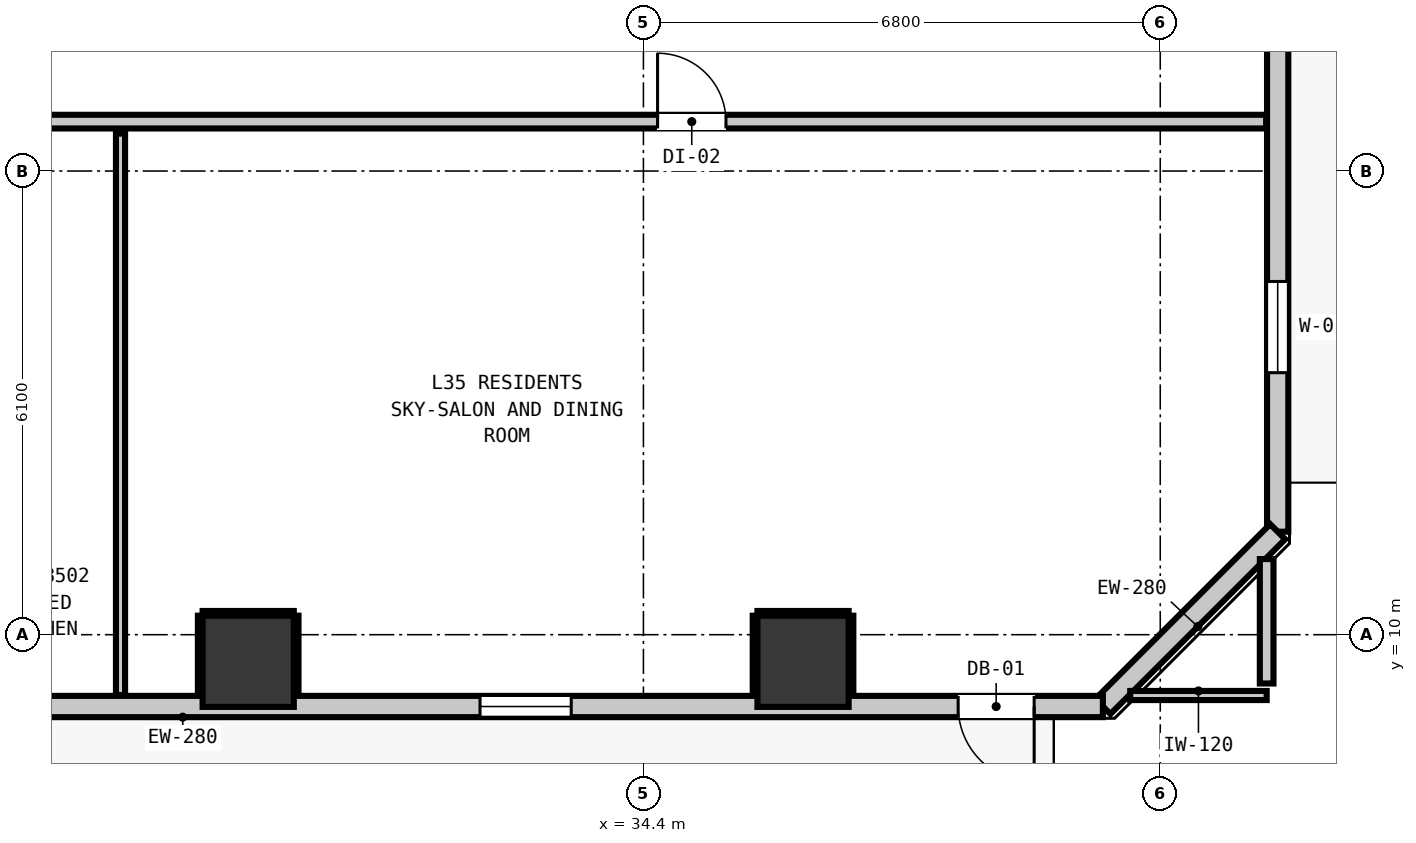
"""IFC4 building model, lengths in metres.
Left out: names, types, materials, properties, quantities, classifications, styles, units other than length and angle.
Written with IfcOpenShell. Run it as: python <this file> out.ifc"""

import sys

from ifc_helpers import new_model, si_unit, direction, frame, frame_2d, origin, origin_2d, place, context, subcontext, project, spatial, rectangle, extrude, element, fill, save


model = new_model("IFC4")
c1 = context("Model", 3, precision=1e-05, world=origin(), true_north=direction((0.0, 1.0)))
c2 = subcontext(c1, "Body", "Model", "MODEL_VIEW")
j1 = project(units=[si_unit("LENGTHUNIT", "METRE"), si_unit("PLANEANGLEUNIT", "RADIAN")], contexts=[c1])
p1 = place(None, origin())
s1 = spatial("IfcSite", under=j1, at=p1, CompositionType="ELEMENT")
p2 = place(p1, origin())
s2 = spatial("IfcBuilding", under=s1, at=p2, CompositionType="ELEMENT")
p3 = place(p2, frame((0.0, 0.0, 122.68)))
s3 = spatial("IfcBuildingStorey", under=s2, at=p3, CompositionType="ELEMENT", Elevation=122.68)
for number, where, z_axis, x_axis in (
    (1, (29.2, 9.65, 0.0), (0.0, 0.0, 1.0), (1.0, 0.0, 0.0)),
    (2, (36.5, 9.65, 0.0), (0.0, 0.0, 1.0), (1.0, 0.0, 0.0)),
):
    element("IfcColumn", number, at=place(p3, frame(where, z_axis=z_axis, x_axis=x_axis)), inside=s3, PredefinedType="COLUMN", context=c2, shape_type="SweptSolid", body=[
        extrude(rectangle(XDim=1.2, YDim=1.2, at=origin_2d()), origin(), (0.0, 0.0, 1.0), 2.9),
    ])
p4 = place(p3, frame((42.745, 43.645, 0.0), z_axis=(0.0, 0.0, 1.0), x_axis=(0.0, -1.0, 0.0)))
e3 = element("IfcWall", 3, at=p4, inside=s3, PredefinedType="STANDARD", context=c2, shape_type="SweptSolid", body=[
    extrude(rectangle(XDim=32.29, YDim=0.28, at=frame_2d((16.145, 0.0))), origin(), (0.0, 0.0, 1.0), 2.9),
])
p5 = place(p4, frame((5.467, 0.0, 0.0)))
e4 = element("IfcOpeningElement", 4, at=p5, cuts=e3, PredefinedType="OPENING", context=c2, shape_type="SweptSolid", body=[
    extrude(rectangle(XDim=1.0, YDim=2.15, at=frame_2d((0.5, 1.075))), frame((0.0, 0.15, 0.0), z_axis=(0.0, -1.0, 0.0), x_axis=(1.0, 0.0, 0.0)), (0.0, 0.0, 1.0), 0.3),
])
p6 = place(p4, frame((28.998, 0.0, 0.85)))
e5 = element("IfcOpeningElement", 5, at=p6, cuts=e3, PredefinedType="OPENING", context=c2, shape_type="SweptSolid", body=[
    extrude(rectangle(XDim=1.2, YDim=1.8, at=frame_2d((0.6, 0.9))), frame((0.0, 0.15, 0.0), z_axis=(0.0, -1.0, 0.0), x_axis=(1.0, 0.0, 0.0)), (0.0, 0.0, 1.0), 0.3),
])
p7 = place(p4, frame((0.318, 0.0, 0.85)))
e6 = element("IfcOpeningElement", 6, at=p7, cuts=e3, PredefinedType="OPENING", context=c2, shape_type="SweptSolid", body=[
    extrude(rectangle(XDim=1.05, YDim=1.65, at=frame_2d((0.525, 0.825))), frame((0.0, 0.15, 0.0), z_axis=(0.0, -1.0, 0.0), x_axis=(1.0, 0.0, 0.0)), (0.0, 0.0, 1.0), 0.3),
])
p8 = place(p4, frame((15.783, 0.0, 0.85)))
e7 = element("IfcOpeningElement", 7, at=p8, cuts=e3, PredefinedType="OPENING", context=c2, shape_type="SweptSolid", body=[
    extrude(rectangle(XDim=1.2, YDim=1.8, at=frame_2d((0.6, 0.9))), frame((0.0, 0.15, 0.0), z_axis=(0.0, -1.0, 0.0), x_axis=(1.0, 0.0, 0.0)), (0.0, 0.0, 1.0), 0.3),
])
p9 = place(p3, frame((42.745, 11.355, 0.0), z_axis=(0.0, 0.0, 1.0), x_axis=(-0.707106781187, -0.707106781187, 0.0)))
e8 = element("IfcWall", 8, at=p9, inside=s3, PredefinedType="STANDARD", context=c2, shape_type="SweptSolid", body=[
    extrude(rectangle(XDim=3.253, YDim=0.28, at=frame_2d((1.626, 0.0))), origin(), (0.0, 0.0, 1.0), 2.9),
])
p10 = place(p3, frame((40.445, 9.055, 0.0), z_axis=(0.0, 0.0, 1.0), x_axis=(-1.0, 0.0, 0.0)))
e9 = element("IfcWall", 9, at=p10, inside=s3, PredefinedType="STANDARD", context=c2, shape_type="SweptSolid", body=[
    extrude(rectangle(XDim=35.09, YDim=0.28, at=frame_2d((17.545, 0.0))), origin(), (0.0, 0.0, 1.0), 2.9),
])
p11 = place(p10, frame((0.904, 0.0, 0.0)))
e10 = element("IfcOpeningElement", 10, at=p11, cuts=e9, PredefinedType="OPENING", context=c2, shape_type="SweptSolid", body=[
    extrude(rectangle(XDim=1.0, YDim=2.15, at=frame_2d((0.5, 1.075))), frame((0.0, 0.15, 0.0), z_axis=(0.0, -1.0, 0.0), x_axis=(1.0, 0.0, 0.0)), (0.0, 0.0, 1.0), 0.3),
])
p12 = place(p10, frame((30.341, 0.0, 0.85)))
e11 = element("IfcOpeningElement", 11, at=p12, cuts=e9, PredefinedType="OPENING", context=c2, shape_type="SweptSolid", body=[
    extrude(rectangle(XDim=1.2, YDim=1.8, at=frame_2d((0.6, 0.9))), frame((0.0, 0.15, 0.0), z_axis=(0.0, -1.0, 0.0), x_axis=(1.0, 0.0, 0.0)), (0.0, 0.0, 1.0), 0.3),
])
p13 = place(p10, frame((33.579, 0.0, 0.85)))
e12 = element("IfcOpeningElement", 12, at=p13, cuts=e9, PredefinedType="OPENING", context=c2, shape_type="SweptSolid", body=[
    extrude(rectangle(XDim=1.2, YDim=1.8, at=frame_2d((0.6, 0.9))), frame((0.0, 0.15, 0.0), z_axis=(0.0, -1.0, 0.0), x_axis=(1.0, 0.0, 0.0)), (0.0, 0.0, 1.0), 0.3),
])
p14 = place(p10, frame((16.017, 0.0, 0.85)))
e13 = element("IfcOpeningElement", 13, at=p14, cuts=e9, PredefinedType="OPENING", context=c2, shape_type="SweptSolid", body=[
    extrude(rectangle(XDim=1.2, YDim=1.8, at=frame_2d((0.6, 0.9))), frame((0.0, 0.15, 0.0), z_axis=(0.0, -1.0, 0.0), x_axis=(1.0, 0.0, 0.0)), (0.0, 0.0, 1.0), 0.3),
])
p15 = place(p10, frame((21.665, 0.0, 0.85)))
e14 = element("IfcOpeningElement", 14, at=p15, cuts=e9, PredefinedType="OPENING", context=c2, shape_type="SweptSolid", body=[
    extrude(rectangle(XDim=1.2, YDim=1.8, at=frame_2d((0.6, 0.9))), frame((0.0, 0.15, 0.0), z_axis=(0.0, -1.0, 0.0), x_axis=(1.0, 0.0, 0.0)), (0.0, 0.0, 1.0), 0.3),
])
p16 = place(p10, frame((6.995, 0.0, 0.85)))
e15 = element("IfcOpeningElement", 15, at=p16, cuts=e9, PredefinedType="OPENING", context=c2, shape_type="SweptSolid", body=[
    extrude(rectangle(XDim=1.2, YDim=1.8, at=frame_2d((0.6, 0.9))), frame((0.0, 0.15, 0.0), z_axis=(0.0, -1.0, 0.0), x_axis=(1.0, 0.0, 0.0)), (0.0, 0.0, 1.0), 0.3),
])
p17 = place(p3, frame((3.207, 16.75, 0.0), z_axis=(0.0, 0.0, 1.0), x_axis=(1.0, 0.0, 0.0)))
e16 = element("IfcWall", 16, at=p17, inside=s3, PredefinedType="PARTITIONING", context=c2, shape_type="SweptSolid", body=[
    extrude(rectangle(XDim=39.386, YDim=0.18, at=frame_2d((19.693, 0.0))), origin(), (0.0, 0.0, 1.0), 2.9),
])
p18 = place(p17, frame((5.797, 0.0, 0.0)))
e17 = element("IfcOpeningElement", 17, at=p18, cuts=e16, PredefinedType="OPENING", context=c2, shape_type="SweptSolid", body=[
    extrude(rectangle(XDim=1.0, YDim=2.15, at=frame_2d((0.5, 1.075))), frame((0.0, 0.1, 0.0), z_axis=(0.0, -1.0, 0.0), x_axis=(1.0, 0.0, 0.0)), (0.0, 0.0, 1.0), 0.2),
])
p19 = place(p17, frame((20.121, 0.0, 0.0)))
e18 = element("IfcOpeningElement", 18, at=p19, cuts=e16, PredefinedType="OPENING", context=c2, shape_type="SweptSolid", body=[
    extrude(rectangle(XDim=1.0, YDim=2.15, at=frame_2d((0.5, 1.075))), frame((0.0, 0.1, 0.0), z_axis=(0.0, -1.0, 0.0), x_axis=(1.0, 0.0, 0.0)), (0.0, 0.0, 1.0), 0.2),
])
p20 = place(p17, frame((31.379, 0.0, 0.0)))
e19 = element("IfcOpeningElement", 19, at=p20, cuts=e16, PredefinedType="OPENING", context=c2, shape_type="SweptSolid", body=[
    extrude(rectangle(XDim=0.9, YDim=2.1, at=frame_2d((0.45, 1.05))), frame((0.0, 0.1, 0.0), z_axis=(0.0, -1.0, 0.0), x_axis=(1.0, 0.0, 0.0)), (0.0, 0.0, 1.0), 0.2),
])
p21 = place(p3, frame((40.805, 9.2, 0.0), z_axis=(0.0, 0.0, 1.0), x_axis=(1.0, 0.0, 0.0)))
e20 = element("IfcWall", 20, at=p21, inside=s3, PredefinedType="PARTITIONING", context=c2, shape_type="SweptSolid", body=[
    extrude(rectangle(XDim=1.795, YDim=0.12, at=frame_2d((0.897, 0.0))), origin(), (0.0, 0.0, 1.0), 2.9),
])
p22 = place(p3, frame((42.6, 9.358, 0.0), z_axis=(0.0, 0.0, 1.0), x_axis=(0.0, 1.0, 0.0)))
e21 = element("IfcWall", 21, at=p22, inside=s3, PredefinedType="PARTITIONING", context=c2, shape_type="SweptSolid", body=[
    extrude(rectangle(XDim=1.637, YDim=0.18, at=frame_2d((0.819, 0.0))), origin(), (0.0, 0.0, 1.0), 2.9),
])
p23 = place(p3, frame((27.52, 9.207, 0.0), z_axis=(0.0, 0.0, 1.0), x_axis=(0.0, 1.0, 0.0)))
e22 = element("IfcWall", 22, at=p23, inside=s3, PredefinedType="PARTITIONING", context=c2, shape_type="SweptSolid", body=[
    extrude(rectangle(XDim=7.385, YDim=0.12, at=frame_2d((3.692, 0.0))), origin(), (0.0, 0.0, 1.0), 2.9),
])
p24 = place(p3, frame((28.6, 10.282, 0.0), z_axis=(0.0, 0.0, 1.0), x_axis=(1.0, 0.0, 0.0)))
e23 = element("IfcWall", 23, at=p24, inside=s3, PredefinedType="PARTITIONING", context=c2, shape_type="SweptSolid", body=[
    extrude(rectangle(XDim=1.2, YDim=0.06, at=frame_2d((0.6, 0.0))), origin(), (0.0, 0.0, 1.0), 1.45),
])
for number, where, z_axis, x_axis in (
    (24, (28.568, 9.21, 0.0), (0.0, 0.0, 1.0), (0.0, 1.0, 0.0)),
    (25, (29.832, 9.21, 0.0), (0.0, 0.0, 1.0), (0.0, 1.0, 0.0)),
):
    element("IfcWall", number, at=place(p3, frame(where, z_axis=z_axis, x_axis=x_axis)), inside=s3, PredefinedType="PARTITIONING", context=c2, shape_type="SweptSolid", body=[
        extrude(rectangle(XDim=1.04, YDim=0.06, at=frame_2d((0.52, 0.0))), origin(), (0.0, 0.0, 1.0), 0.905),
    ])
p25 = place(p3, frame((35.9, 10.282, 0.0), z_axis=(0.0, 0.0, 1.0), x_axis=(1.0, 0.0, 0.0)))
e26 = element("IfcWall", 26, at=p25, inside=s3, PredefinedType="PARTITIONING", context=c2, shape_type="SweptSolid", body=[
    extrude(rectangle(XDim=1.2, YDim=0.06, at=frame_2d((0.6, 0.0))), origin(), (0.0, 0.0, 1.0), 1.45),
])
for number, where, z_axis, x_axis in (
    (27, (35.868, 9.21, 0.0), (0.0, 0.0, 1.0), (0.0, 1.0, 0.0)),
    (28, (37.132, 9.21, 0.0), (0.0, 0.0, 1.0), (0.0, 1.0, 0.0)),
):
    element("IfcWall", number, at=place(p3, frame(where, z_axis=z_axis, x_axis=x_axis)), inside=s3, PredefinedType="PARTITIONING", context=c2, shape_type="SweptSolid", body=[
        extrude(rectangle(XDim=1.04, YDim=0.06, at=frame_2d((0.52, 0.0))), origin(), (0.0, 0.0, 1.0), 0.905),
    ])
p26 = place(p11, origin())
e29 = element("IfcDoor", 29, at=p26, inside=s3, OperationType="SINGLE_SWING_LEFT", PredefinedType="DOOR", context=c2, shape_type="SweptSolid", body=[
    extrude(rectangle(XDim=1.0, YDim=2.15, at=frame_2d((0.5, 1.075))), frame((0.0, 0.025, 0.0), z_axis=(0.0, -1.0, 0.0), x_axis=(1.0, 0.0, 0.0)), (0.0, 0.0, 1.0), 0.05),
])
fill(e10, e29)
p27 = place(p6, origin())
e30 = element("IfcWindow", 30, at=p27, inside=s3, PartitioningType="SINGLE_PANEL", PredefinedType="WINDOW", context=c2, shape_type="SweptSolid", body=[
    extrude(rectangle(XDim=1.2, YDim=1.8, at=frame_2d((0.6, 0.9))), frame((0.0, 0.03, 0.0), z_axis=(0.0, -1.0, 0.0), x_axis=(1.0, 0.0, 0.0)), (0.0, 0.0, 1.0), 0.06),
])
fill(e5, e30)
p28 = place(p16, origin())
e31 = element("IfcWindow", 31, at=p28, inside=s3, PartitioningType="SINGLE_PANEL", PredefinedType="WINDOW", context=c2, shape_type="SweptSolid", body=[
    extrude(rectangle(XDim=1.2, YDim=1.8, at=frame_2d((0.6, 0.9))), frame((0.0, 0.03, 0.0), z_axis=(0.0, -1.0, 0.0), x_axis=(1.0, 0.0, 0.0)), (0.0, 0.0, 1.0), 0.06),
])
fill(e15, e31)
p29 = place(p20, origin())
e32 = element("IfcDoor", 32, at=p29, inside=s3, OperationType="SINGLE_SWING_LEFT", PredefinedType="DOOR", context=c2, shape_type="SweptSolid", body=[
    extrude(rectangle(XDim=0.9, YDim=2.1, at=frame_2d((0.45, 1.05))), frame((0.0, 0.025, 0.0), z_axis=(0.0, -1.0, 0.0), x_axis=(1.0, 0.0, 0.0)), (0.0, 0.0, 1.0), 0.05),
])
fill(e19, e32)
save(model, sys.argv[1])
